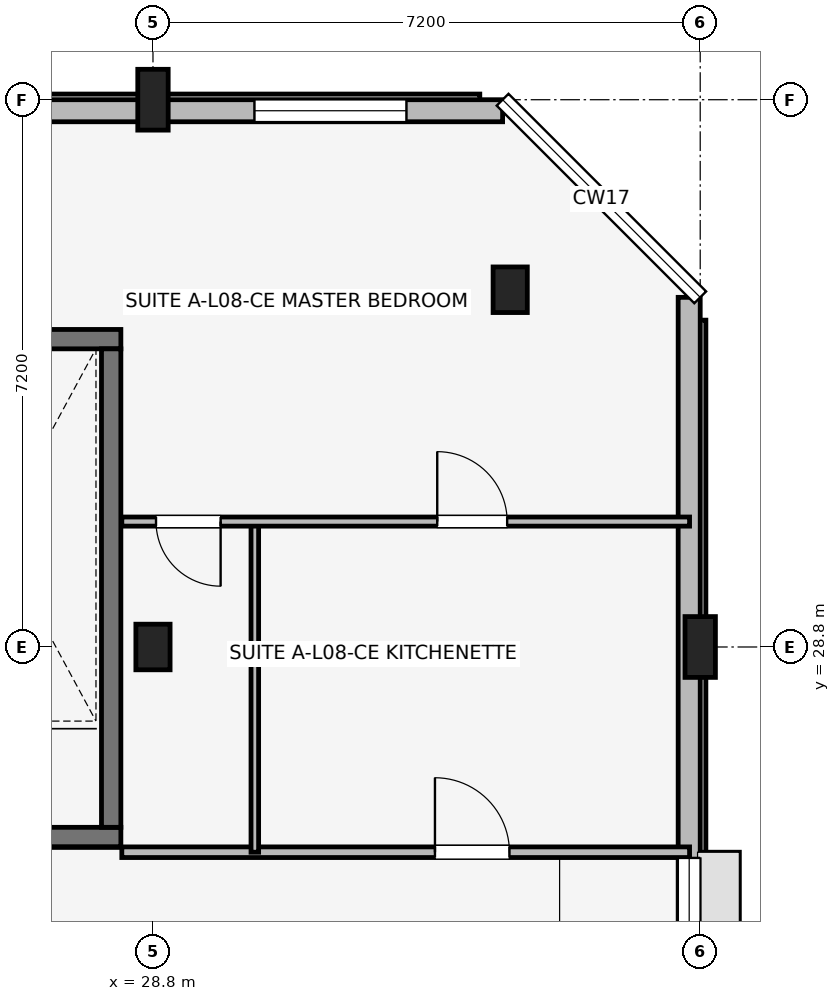
"""IFC4 building model, lengths in metres.
Left out: names, types, materials, properties, quantities, classifications, styles, units other than length and angle.
Written with IfcOpenShell. Run it as: python <this file> out.ifc"""

import sys

from ifc_helpers import new_model, si_unit, direction, frame, frame_2d, origin, origin_2d, place, context, subcontext, project, spatial, rectangle, extrude, element, fill, save


model = new_model("IFC4")
c1 = context("Model", 3, precision=1e-05, world=origin(), true_north=direction((0.0, 1.0)))
c2 = subcontext(c1, "Body", "Model", "MODEL_VIEW")
j1 = project(units=[si_unit("LENGTHUNIT", "METRE"), si_unit("PLANEANGLEUNIT", "RADIAN")], contexts=[c1])
p1 = place(None, origin())
s1 = spatial("IfcSite", under=j1, at=p1, CompositionType="ELEMENT")
p2 = place(p1, origin())
s2 = spatial("IfcBuilding", under=s1, at=p2, CompositionType="ELEMENT")
p3 = place(p2, frame((0.0, 0.0, 27.6)))
s3 = spatial("IfcBuildingStorey", under=s2, at=p3, CompositionType="ELEMENT", Elevation=27.6)
p4 = place(p3, frame((28.8, 28.8, 0.0), z_axis=(0.0, 0.0, 1.0), x_axis=(1.0, 0.0, 0.0)))
e1 = element("IfcColumn", 1, at=p4, inside=s3, PredefinedType="COLUMN", context=c2, shape_type="SweptSolid", body=[
    extrude(rectangle(XDim=0.45, YDim=0.6, at=origin_2d()), origin(), (0.0, 0.0, 1.0), 3.15),
])
for number, where, z_axis, x_axis in (
    (2, (28.8, 36.0, 0.0), (0.0, 0.0, 1.0), (1.0, 0.0, 0.0)),
    (3, (36.0, 28.8, 0.0), (0.0, 0.0, 1.0), (1.0, 0.0, 0.0)),
):
    element("IfcColumn", number, at=place(p3, frame(where, z_axis=z_axis, x_axis=x_axis)), inside=s3, PredefinedType="COLUMN", context=c2, shape_type="SweptSolid", body=[
        extrude(rectangle(XDim=0.4, YDim=0.8, at=origin_2d()), origin(), (0.0, 0.0, 1.0), 3.15),
    ])
p5 = place(p3, frame((33.5, 33.5, 0.0), z_axis=(0.0, 0.0, 1.0), x_axis=(1.0, 0.0, 0.0)))
e4 = element("IfcColumn", 4, at=p5, inside=s3, PredefinedType="COLUMN", context=c2, shape_type="SweptSolid", body=[
    extrude(rectangle(XDim=0.45, YDim=0.6, at=origin_2d()), origin(), (0.0, 0.0, 1.0), 3.15),
])
p6 = place(p3, frame((25.073, 26.3, 0.0), z_axis=(0.0, 0.0, 1.0), x_axis=(1.0, 0.0, 0.0)))
e5 = element("IfcWall", 5, at=p6, inside=s3, PredefinedType="SHEAR", context=c2, shape_type="SweptSolid", body=[
    extrude(rectangle(XDim=3.305, YDim=0.255, at=frame_2d((1.652, 0.0))), origin(), (0.0, 0.0, 1.0), 3.15),
])
p7 = place(p6, frame((1.127, 0.0, 0.0)))
e6 = element("IfcOpeningElement", 6, at=p7, cuts=e5, PredefinedType="OPENING", context=c2, shape_type="SweptSolid", body=[
    extrude(rectangle(XDim=1.05, YDim=2.12, at=frame_2d((0.525, 1.06))), frame((0.0, 0.137, 0.0), z_axis=(0.0, -1.0, 0.0), x_axis=(1.0, 0.0, 0.0)), (0.0, 0.0, 1.0), 0.275),
])
p8 = place(p3, frame((25.073, 32.85, 0.0), z_axis=(0.0, 0.0, 1.0), x_axis=(1.0, 0.0, 0.0)))
e7 = element("IfcWall", 7, at=p8, inside=s3, PredefinedType="SHEAR", context=c2, shape_type="SweptSolid", body=[
    extrude(rectangle(XDim=3.305, YDim=0.255, at=frame_2d((1.652, 0.0))), origin(), (0.0, 0.0, 1.0), 3.15),
])
p9 = place(p3, frame((28.25, 26.427, 0.0), z_axis=(0.0, 0.0, 1.0), x_axis=(0.0, 1.0, 0.0)))
e8 = element("IfcWall", 8, at=p9, inside=s3, PredefinedType="SHEAR", context=c2, shape_type="SweptSolid", body=[
    extrude(rectangle(XDim=6.295, YDim=0.255, at=frame_2d((3.147, 0.0))), origin(), (0.0, 0.0, 1.0), 3.15),
])
p10 = place(p3, frame((35.855, 20.0, 0.0), z_axis=(0.0, 0.0, 1.0), x_axis=(0.0, 1.0, 0.0)))
e9 = element("IfcWall", 9, at=p10, inside=s3, PredefinedType="SOLIDWALL", context=c2, shape_type="SweptSolid", body=[
    extrude(rectangle(XDim=13.4, YDim=0.29, at=frame_2d((6.7, 0.0))), origin(), (0.0, 0.0, 1.0), 2.43),
])
p11 = place(p10, frame((4.375, 0.0, 1.05)))
e10 = element("IfcOpeningElement", 10, at=p11, cuts=e9, PredefinedType="OPENING", context=c2, shape_type="SweptSolid", body=[
    extrude(rectangle(XDim=1.65, YDim=1.15, at=frame_2d((0.825, 0.575))), frame((0.0, 0.155, 0.0), z_axis=(0.0, -1.0, 0.0), x_axis=(1.0, 0.0, 0.0)), (0.0, 0.0, 1.0), 0.31),
])
p12 = place(p10, frame((2.465, 0.0, 0.75)))
e11 = element("IfcOpeningElement", 11, at=p12, cuts=e9, PredefinedType="OPENING", context=c2, shape_type="SweptSolid", body=[
    extrude(rectangle(XDim=1.3, YDim=1.55, at=frame_2d((0.65, 0.775))), frame((0.0, 0.155, 0.0), z_axis=(0.0, -1.0, 0.0), x_axis=(1.0, 0.0, 0.0)), (0.0, 0.0, 1.0), 0.31),
])
p13 = place(p3, frame((33.4, 35.855, 0.0), z_axis=(0.0, 0.0, 1.0), x_axis=(-1.0, 0.0, 0.0)))
e12 = element("IfcWall", 12, at=p13, inside=s3, PredefinedType="SOLIDWALL", context=c2, shape_type="SweptSolid", body=[
    extrude(rectangle(XDim=30.8, YDim=0.29, at=frame_2d((15.4, 0.0))), origin(), (0.0, 0.0, 1.0), 2.43),
])
p14 = place(p13, frame((14.825, 0.0, 0.5)))
e13 = element("IfcOpeningElement", 13, at=p14, cuts=e12, PredefinedType="OPENING", context=c2, shape_type="SweptSolid", body=[
    extrude(rectangle(XDim=1.15, YDim=1.68, at=frame_2d((0.575, 0.84))), frame((0.0, 0.155, 0.0), z_axis=(0.0, -1.0, 0.0), x_axis=(1.0, 0.0, 0.0)), (0.0, 0.0, 1.0), 0.31),
])
p15 = place(p13, frame((1.265, 0.0, 0.67)))
e14 = element("IfcOpeningElement", 14, at=p15, cuts=e12, PredefinedType="OPENING", context=c2, shape_type="SweptSolid", body=[
    extrude(rectangle(XDim=2.0, YDim=1.65, at=frame_2d((1.0, 0.825))), frame((0.0, 0.155, 0.0), z_axis=(0.0, -1.0, 0.0), x_axis=(1.0, 0.0, 0.0)), (0.0, 0.0, 1.0), 0.31),
])
p16 = place(p13, frame((27.46, 0.0, 0.67)))
e15 = element("IfcOpeningElement", 15, at=p16, cuts=e12, PredefinedType="OPENING", context=c2, shape_type="SweptSolid", body=[
    extrude(rectangle(XDim=2.15, YDim=1.65, at=frame_2d((1.075, 0.825))), frame((0.0, 0.155, 0.0), z_axis=(0.0, -1.0, 0.0), x_axis=(1.0, 0.0, 0.0)), (0.0, 0.0, 1.0), 0.31),
])
p17 = place(p13, frame((8.805, 0.0, 0.67)))
e16 = element("IfcOpeningElement", 16, at=p17, cuts=e12, PredefinedType="OPENING", context=c2, shape_type="SweptSolid", body=[
    extrude(rectangle(XDim=2.3, YDim=1.65, at=frame_2d((1.15, 0.825))), frame((0.0, 0.155, 0.0), z_axis=(0.0, -1.0, 0.0), x_axis=(1.0, 0.0, 0.0)), (0.0, 0.0, 1.0), 0.31),
])
p18 = place(p13, frame((19.595, 0.0, 0.67)))
e17 = element("IfcOpeningElement", 17, at=p18, cuts=e12, PredefinedType="OPENING", context=c2, shape_type="SweptSolid", body=[
    extrude(rectangle(XDim=2.45, YDim=1.65, at=frame_2d((1.225, 0.825))), frame((0.0, 0.155, 0.0), z_axis=(0.0, -1.0, 0.0), x_axis=(1.0, 0.0, 0.0)), (0.0, 0.0, 1.0), 0.31),
])
p19 = place(p3, frame((28.39, 26.1, 0.0), z_axis=(0.0, 0.0, 1.0), x_axis=(1.0, 0.0, 0.0)))
e18 = element("IfcWall", 18, at=p19, inside=s3, PredefinedType="PARTITIONING", context=c2, shape_type="SweptSolid", body=[
    extrude(rectangle(XDim=7.47, YDim=0.14, at=frame_2d((3.735, 0.0))), origin(), (0.0, 0.0, 1.0), 2.38),
])
p20 = place(p19, frame((4.12, 0.0, 0.0)))
e19 = element("IfcOpeningElement", 19, at=p20, cuts=e18, PredefinedType="OPENING", context=c2, shape_type="SweptSolid", body=[
    extrude(rectangle(XDim=0.98, YDim=2.1, at=frame_2d((0.49, 1.05))), frame((0.0, 0.08, 0.0), z_axis=(0.0, -1.0, 0.0), x_axis=(1.0, 0.0, 0.0)), (0.0, 0.0, 1.0), 0.16),
])
p21 = place(p3, frame((30.14, 26.1, 0.0), z_axis=(0.0, 0.0, 1.0), x_axis=(0.0, 1.0, 0.0)))
e20 = element("IfcWall", 20, at=p21, inside=s3, PredefinedType="PARTITIONING", context=c2, shape_type="SweptSolid", body=[
    extrude(rectangle(XDim=4.35, YDim=0.1, at=frame_2d((2.175, 0.0))), origin(), (0.0, 0.0, 1.0), 2.38),
])
p22 = place(p3, frame((28.39, 30.45, 0.0), z_axis=(0.0, 0.0, 1.0), x_axis=(1.0, 0.0, 0.0)))
e21 = element("IfcWall", 21, at=p22, inside=s3, PredefinedType="PARTITIONING", context=c2, shape_type="SweptSolid", body=[
    extrude(rectangle(XDim=7.47, YDim=0.12, at=frame_2d((3.735, 0.0))), origin(), (0.0, 0.0, 1.0), 2.38),
])
p23 = place(p22, frame((1.3, 0.0, 0.0), z_axis=(0.0, 0.0, 1.0), x_axis=(-1.0, 0.0, 0.0)))
e22 = element("IfcOpeningElement", 22, at=p23, cuts=e21, PredefinedType="OPENING", context=c2, shape_type="SweptSolid", body=[
    extrude(rectangle(XDim=0.85, YDim=2.08, at=frame_2d((0.425, 1.04))), frame((0.0, 0.07, 0.0), z_axis=(0.0, -1.0, 0.0), x_axis=(1.0, 0.0, 0.0)), (0.0, 0.0, 1.0), 0.14),
])
p24 = place(p22, frame((4.15, 0.0, 0.0)))
e23 = element("IfcOpeningElement", 23, at=p24, cuts=e21, PredefinedType="OPENING", context=c2, shape_type="SweptSolid", body=[
    extrude(rectangle(XDim=0.92, YDim=2.08, at=frame_2d((0.46, 1.04))), frame((0.0, 0.07, 0.0), z_axis=(0.0, -1.0, 0.0), x_axis=(1.0, 0.0, 0.0)), (0.0, 0.0, 1.0), 0.14),
])
p25 = place(p15, origin())
e24 = element("IfcWindow", 24, at=p25, inside=s3, PartitioningType="SINGLE_PANEL", PredefinedType="WINDOW", context=c2, shape_type="SweptSolid", body=[
    extrude(rectangle(XDim=2.0, YDim=1.65, at=frame_2d((1.0, 0.825))), frame((0.0, 0.03, 0.0), z_axis=(0.0, -1.0, 0.0), x_axis=(1.0, 0.0, 0.0)), (0.0, 0.0, 1.0), 0.06),
])
fill(e14, e24)
p26 = place(p11, origin())
e25 = element("IfcWindow", 25, at=p26, inside=s3, PartitioningType="SINGLE_PANEL", PredefinedType="WINDOW", context=c2, shape_type="SweptSolid", body=[
    extrude(rectangle(XDim=1.65, YDim=1.15, at=frame_2d((0.825, 0.575))), frame((0.0, 0.03, 0.0), z_axis=(0.0, -1.0, 0.0), x_axis=(1.0, 0.0, 0.0)), (0.0, 0.0, 1.0), 0.06),
])
fill(e10, e25)
p27 = place(p20, origin())
e26 = element("IfcDoor", 26, at=p27, inside=s3, OperationType="SINGLE_SWING_LEFT", PredefinedType="DOOR", context=c2, shape_type="SweptSolid", body=[
    extrude(rectangle(XDim=0.98, YDim=2.1, at=frame_2d((0.49, 1.05))), frame((0.0, 0.025, 0.0), z_axis=(0.0, -1.0, 0.0), x_axis=(1.0, 0.0, 0.0)), (0.0, 0.0, 1.0), 0.05),
])
fill(e19, e26)
p28 = place(p23, origin())
e27 = element("IfcDoor", 27, at=p28, inside=s3, OperationType="SINGLE_SWING_RIGHT", PredefinedType="DOOR", context=c2, shape_type="SweptSolid", body=[
    extrude(rectangle(XDim=0.85, YDim=2.08, at=frame_2d((0.425, 1.04))), frame((0.0, 0.025, 0.0), z_axis=(0.0, -1.0, 0.0), x_axis=(1.0, 0.0, 0.0)), (0.0, 0.0, 1.0), 0.05),
])
fill(e22, e27)
p29 = place(p24, origin())
e28 = element("IfcDoor", 28, at=p29, inside=s3, OperationType="SINGLE_SWING_LEFT", PredefinedType="DOOR", context=c2, shape_type="SweptSolid", body=[
    extrude(rectangle(XDim=0.92, YDim=2.08, at=frame_2d((0.46, 1.04))), frame((0.0, 0.025, 0.0), z_axis=(0.0, -1.0, 0.0), x_axis=(1.0, 0.0, 0.0)), (0.0, 0.0, 1.0), 0.05),
])
fill(e23, e28)
save(model, sys.argv[1])
